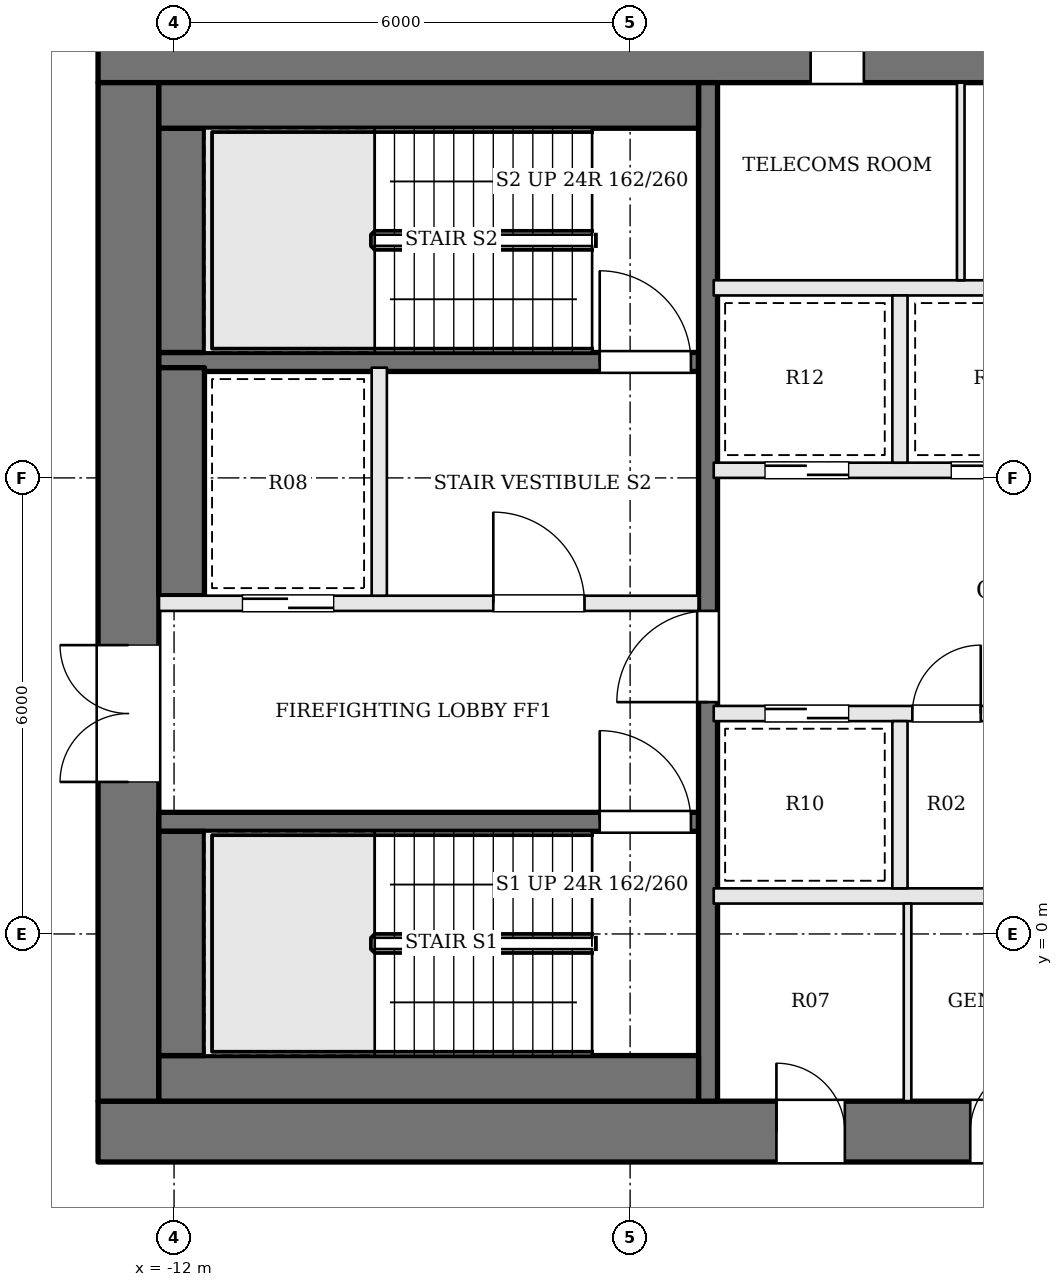
"""IFC4 building model, lengths in metres.
Left out: names, types, materials, properties, quantities, classifications, styles, units other than length and angle.
Written with IfcOpenShell. Run it as: python <this file> out.ifc"""

import sys

from ifc_helpers import new_model, si_unit, direction, frame, frame_2d, origin, place, context, subcontext, project, spatial, rectangle, extrude, element, fill, save


model = new_model("IFC4")
c1 = context("Model", 3, precision=1e-05, world=origin(), true_north=direction((0.0, 1.0)))
c2 = subcontext(c1, "Body", "Model", "MODEL_VIEW")
j1 = project(units=[si_unit("LENGTHUNIT", "METRE"), si_unit("PLANEANGLEUNIT", "RADIAN")], contexts=[c1])
p1 = place(None, origin())
s1 = spatial("IfcSite", under=j1, at=p1, CompositionType="ELEMENT")
p2 = place(p1, origin())
s2 = spatial("IfcBuilding", under=s1, at=p2, CompositionType="ELEMENT")
p3 = place(p2, frame((0.0, 0.0, 181.8)))
s3 = spatial("IfcBuildingStorey", under=s2, at=p3, CompositionType="ELEMENT", Elevation=181.8)
p4 = place(p3, frame((-13.0, 11.6, 0.0), z_axis=(0.0, 0.0, 1.0), x_axis=(1.0, 0.0, 0.0)))
e1 = element("IfcWall", 1, at=p4, inside=s3, PredefinedType="SHEAR", context=c2, shape_type="SweptSolid", body=[
    extrude(rectangle(XDim=26.0, YDim=0.8, at=frame_2d((13.0, 0.0))), origin(), (0.0, 0.0, 1.0), 3.9),
])
p5 = place(p4, frame((9.375, 0.0, 0.0)))
e2 = element("IfcOpeningElement", 2, at=p5, cuts=e1, PredefinedType="OPENING", context=c2, shape_type="SweptSolid", body=[
    extrude(rectangle(XDim=0.7, YDim=2.1, at=frame_2d((0.35, 1.05))), frame((0.0, 0.41, 0.0), z_axis=(0.0, -1.0, 0.0), x_axis=(1.0, 0.0, 0.0)), (0.0, 0.0, 1.0), 0.82),
])
p6 = place(p4, frame((12.075, 0.0, 0.0)))
e3 = element("IfcOpeningElement", 3, at=p6, cuts=e1, PredefinedType="OPENING", context=c2, shape_type="SweptSolid", body=[
    extrude(rectangle(XDim=1.0, YDim=2.1, at=frame_2d((0.5, 1.05))), frame((0.0, 0.41, 0.0), z_axis=(0.0, -1.0, 0.0), x_axis=(1.0, 0.0, 0.0)), (0.0, 0.0, 1.0), 0.82),
])
p7 = place(p4, frame((14.675, 0.0, 0.0)))
e4 = element("IfcOpeningElement", 4, at=p7, cuts=e1, PredefinedType="OPENING", context=c2, shape_type="SweptSolid", body=[
    extrude(rectangle(XDim=0.7, YDim=2.1, at=frame_2d((0.35, 1.05))), frame((0.0, 0.41, 0.0), z_axis=(0.0, -1.0, 0.0), x_axis=(1.0, 0.0, 0.0)), (0.0, 0.0, 1.0), 0.82),
])
p8 = place(p4, frame((16.625, 0.0, 0.0)))
e5 = element("IfcOpeningElement", 5, at=p8, cuts=e1, PredefinedType="OPENING", context=c2, shape_type="SweptSolid", body=[
    extrude(rectangle(XDim=0.9, YDim=2.1, at=frame_2d((0.45, 1.05))), frame((0.0, 0.41, 0.0), z_axis=(0.0, -1.0, 0.0), x_axis=(1.0, 0.0, 0.0)), (0.0, 0.0, 1.0), 0.82),
])
p9 = place(p3, frame((-13.0, -2.6, 0.0), z_axis=(0.0, 0.0, 1.0), x_axis=(1.0, 0.0, 0.0)))
e6 = element("IfcWall", 6, at=p9, inside=s3, PredefinedType="SHEAR", context=c2, shape_type="SweptSolid", body=[
    extrude(rectangle(XDim=26.0, YDim=0.8, at=frame_2d((13.0, 0.0))), origin(), (0.0, 0.0, 1.0), 3.9),
])
p10 = place(p9, frame((8.925, 0.0, 0.0)))
e7 = element("IfcOpeningElement", 7, at=p10, cuts=e6, PredefinedType="OPENING", context=c2, shape_type="SweptSolid", body=[
    extrude(rectangle(XDim=0.9, YDim=2.1, at=frame_2d((0.45, 1.05))), frame((0.0, 0.41, 0.0), z_axis=(0.0, -1.0, 0.0), x_axis=(1.0, 0.0, 0.0)), (0.0, 0.0, 1.0), 0.82),
])
p11 = place(p9, frame((11.475, 0.0, 0.0)))
e8 = element("IfcOpeningElement", 8, at=p11, cuts=e6, PredefinedType="OPENING", context=c2, shape_type="SweptSolid", body=[
    extrude(rectangle(XDim=0.9, YDim=2.1, at=frame_2d((0.45, 1.05))), frame((0.0, 0.41, 0.0), z_axis=(0.0, -1.0, 0.0), x_axis=(1.0, 0.0, 0.0)), (0.0, 0.0, 1.0), 0.82),
])
p12 = place(p9, frame((13.6, 0.0, 0.0)))
e9 = element("IfcOpeningElement", 9, at=p12, cuts=e6, PredefinedType="OPENING", context=c2, shape_type="SweptSolid", body=[
    extrude(rectangle(XDim=1.0, YDim=2.1, at=frame_2d((0.5, 1.05))), frame((0.0, 0.41, 0.0), z_axis=(0.0, -1.0, 0.0), x_axis=(1.0, 0.0, 0.0)), (0.0, 0.0, 1.0), 0.82),
])
p13 = place(p9, frame((15.95, 0.0, 0.0)))
e10 = element("IfcOpeningElement", 10, at=p13, cuts=e6, PredefinedType="OPENING", context=c2, shape_type="SweptSolid", body=[
    extrude(rectangle(XDim=1.0, YDim=2.1, at=frame_2d((0.5, 1.05))), frame((0.0, 0.41, 0.0), z_axis=(0.0, -1.0, 0.0), x_axis=(1.0, 0.0, 0.0)), (0.0, 0.0, 1.0), 0.82),
])
p14 = place(p3, frame((-12.6, -2.2, 0.0), z_axis=(0.0, 0.0, 1.0), x_axis=(0.0, 1.0, 0.0)))
e11 = element("IfcWall", 11, at=p14, inside=s3, PredefinedType="SHEAR", context=c2, shape_type="SweptSolid", body=[
    extrude(rectangle(XDim=13.4, YDim=0.8, at=frame_2d((6.7, 0.0))), origin(), (0.0, 0.0, 1.0), 3.9),
])
p15 = place(p14, frame((4.2, 0.0, 0.0)))
e12 = element("IfcOpeningElement", 12, at=p15, cuts=e11, PredefinedType="OPENING", context=c2, shape_type="SweptSolid", body=[
    extrude(rectangle(XDim=1.8, YDim=2.1, at=frame_2d((0.9, 1.05))), frame((0.0, 0.41, 0.0), z_axis=(0.0, -1.0, 0.0), x_axis=(1.0, 0.0, 0.0)), (0.0, 0.0, 1.0), 0.82),
])
p16 = place(p3, frame((-12.2, 1.475, 0.0), z_axis=(0.0, 0.0, 1.0), x_axis=(1.0, 0.0, 0.0)))
e13 = element("IfcWall", 13, at=p16, inside=s3, PredefinedType="SOLIDWALL", context=c2, shape_type="SweptSolid", body=[
    extrude(rectangle(XDim=7.1, YDim=0.25, at=frame_2d((3.55, 0.0))), origin(), (0.0, 0.0, 1.0), 3.7),
])
p17 = place(p16, frame((5.8, 0.0, 0.0)))
e14 = element("IfcOpeningElement", 14, at=p17, cuts=e13, PredefinedType="OPENING", context=c2, shape_type="SweptSolid", body=[
    extrude(rectangle(XDim=1.2, YDim=2.1, at=frame_2d((0.6, 1.05))), frame((0.0, 0.135, 0.0), z_axis=(0.0, -1.0, 0.0), x_axis=(1.0, 0.0, 0.0)), (0.0, 0.0, 1.0), 0.27),
])
p18 = place(p3, frame((-12.2, 4.35, 0.0), z_axis=(0.0, 0.0, 1.0), x_axis=(1.0, 0.0, 0.0)))
e15 = element("IfcWall", 15, at=p18, inside=s3, PredefinedType="SOLIDWALL", context=c2, shape_type="SweptSolid", body=[
    extrude(rectangle(XDim=7.1, YDim=0.2, at=frame_2d((3.55, 0.0))), origin(), (0.0, 0.0, 1.0), 3.7),
])
p19 = place(p18, frame((4.4, 0.0, 0.0)))
e16 = element("IfcOpeningElement", 16, at=p19, cuts=e15, PredefinedType="OPENING", context=c2, shape_type="SweptSolid", body=[
    extrude(rectangle(XDim=1.2, YDim=2.1, at=frame_2d((0.6, 1.05))), frame((0.0, 0.11, 0.0), z_axis=(0.0, -1.0, 0.0), x_axis=(1.0, 0.0, 0.0)), (0.0, 0.0, 1.0), 0.22),
])
p20 = place(p18, frame((1.1, 0.0, 0.0)))
e17 = element("IfcOpeningElement", 17, at=p20, cuts=e15, PredefinedType="OPENING", context=c2, shape_type="SweptSolid", body=[
    extrude(rectangle(XDim=1.2, YDim=2.1, at=frame_2d((0.6, 1.05))), frame((0.0, 0.11, 0.0), z_axis=(0.0, -1.0, 0.0), x_axis=(1.0, 0.0, 0.0)), (0.0, 0.0, 1.0), 0.22),
])
p21 = place(p3, frame((-12.2, 7.525, 0.0), z_axis=(0.0, 0.0, 1.0), x_axis=(1.0, 0.0, 0.0)))
e18 = element("IfcWall", 18, at=p21, inside=s3, PredefinedType="SOLIDWALL", context=c2, shape_type="SweptSolid", body=[
    extrude(rectangle(XDim=7.1, YDim=0.25, at=frame_2d((3.55, 0.0))), origin(), (0.0, 0.0, 1.0), 3.7),
])
p22 = place(p21, frame((5.8, 0.0, 0.0)))
e19 = element("IfcOpeningElement", 19, at=p22, cuts=e18, PredefinedType="OPENING", context=c2, shape_type="SweptSolid", body=[
    extrude(rectangle(XDim=1.2, YDim=2.1, at=frame_2d((0.6, 1.05))), frame((0.0, 0.135, 0.0), z_axis=(0.0, -1.0, 0.0), x_axis=(1.0, 0.0, 0.0)), (0.0, 0.0, 1.0), 0.27),
])
p23 = place(p3, frame((-9.3, 4.45, 0.0), z_axis=(0.0, 0.0, 1.0), x_axis=(0.0, 1.0, 0.0)))
e20 = element("IfcWall", 20, at=p23, inside=s3, PredefinedType="SOLIDWALL", context=c2, shape_type="SweptSolid", body=[
    extrude(rectangle(XDim=3.0, YDim=0.2, at=frame_2d((1.5, 0.0))), origin(), (0.0, 0.0, 1.0), 3.7),
])
p24 = place(p3, frame((-4.975, -2.2, 0.0), z_axis=(0.0, 0.0, 1.0), x_axis=(0.0, 1.0, 0.0)))
e21 = element("IfcWall", 21, at=p24, inside=s3, PredefinedType="SOLIDWALL", context=c2, shape_type="SweptSolid", body=[
    extrude(rectangle(XDim=13.4, YDim=0.25, at=frame_2d((6.7, 0.0))), origin(), (0.0, 0.0, 1.0), 3.7),
])
p25 = place(p24, frame((5.25, 0.0, 0.0)))
e22 = element("IfcOpeningElement", 22, at=p25, cuts=e21, PredefinedType="OPENING", context=c2, shape_type="SweptSolid", body=[
    extrude(rectangle(XDim=1.2, YDim=2.1, at=frame_2d((0.6, 1.05))), frame((0.0, 0.135, 0.0), z_axis=(0.0, -1.0, 0.0), x_axis=(1.0, 0.0, 0.0)), (0.0, 0.0, 1.0), 0.27),
])
p26 = place(p3, frame((-12.2, -1.9, 0.0), z_axis=(0.0, 0.0, 1.0), x_axis=(1.0, 0.0, 0.0)))
e23 = element("IfcWall", 23, at=p26, inside=s3, PredefinedType="SOLIDWALL", context=c2, shape_type="SweptSolid", body=[
    extrude(rectangle(XDim=7.1, YDim=0.6, at=frame_2d((3.55, 0.0))), origin(), (0.0, 0.0, 1.0), 3.7),
])
p27 = place(p3, frame((-11.9, -1.6, 0.0), z_axis=(0.0, 0.0, 1.0), x_axis=(0.0, 1.0, 0.0)))
e24 = element("IfcWall", 24, at=p27, inside=s3, PredefinedType="SOLIDWALL", context=c2, shape_type="SweptSolid", body=[
    extrude(rectangle(XDim=2.95, YDim=0.6, at=frame_2d((1.475, 0.0))), origin(), (0.0, 0.0, 1.0), 3.7),
])
p28 = place(p3, frame((-11.9, 4.45, 0.0), z_axis=(0.0, 0.0, 1.0), x_axis=(0.0, 1.0, 0.0)))
e25 = element("IfcWall", 25, at=p28, inside=s3, PredefinedType="SOLIDWALL", context=c2, shape_type="SweptSolid", body=[
    extrude(rectangle(XDim=3.0, YDim=0.6, at=frame_2d((1.5, 0.0))), origin(), (0.0, 0.0, 1.0), 3.7),
])
p29 = place(p3, frame((-11.9, 7.65, 0.0), z_axis=(0.0, 0.0, 1.0), x_axis=(0.0, 1.0, 0.0)))
e26 = element("IfcWall", 26, at=p29, inside=s3, PredefinedType="SOLIDWALL", context=c2, shape_type="SweptSolid", body=[
    extrude(rectangle(XDim=2.95, YDim=0.6, at=frame_2d((1.475, 0.0))), origin(), (0.0, 0.0, 1.0), 3.7),
])
p30 = place(p3, frame((-12.2, 10.9, 0.0), z_axis=(0.0, 0.0, 1.0), x_axis=(1.0, 0.0, 0.0)))
e27 = element("IfcWall", 27, at=p30, inside=s3, PredefinedType="SOLIDWALL", context=c2, shape_type="SweptSolid", body=[
    extrude(rectangle(XDim=7.1, YDim=0.6, at=frame_2d((3.55, 0.0))), origin(), (0.0, 0.0, 1.0), 3.7),
])
p31 = place(p3, frame((-4.9, 0.5, 0.0), z_axis=(0.0, 0.0, 1.0), x_axis=(1.0, 0.0, 0.0)))
e28 = element("IfcWall", 28, at=p31, inside=s3, PredefinedType="SOLIDWALL", context=c2, shape_type="SweptSolid", body=[
    extrude(rectangle(XDim=9.8, YDim=0.2, at=frame_2d((4.9, 0.0))), origin(), (0.0, 0.0, 1.0), 3.7),
])
p32 = place(p3, frame((-4.9, 2.9, 0.0), z_axis=(0.0, 0.0, 1.0), x_axis=(1.0, 0.0, 0.0)))
e29 = element("IfcWall", 29, at=p32, inside=s3, PredefinedType="SOLIDWALL", context=c2, shape_type="SweptSolid", body=[
    extrude(rectangle(XDim=9.8, YDim=0.2, at=frame_2d((4.9, 0.0))), origin(), (0.0, 0.0, 1.0), 3.7),
])
p33 = place(p32, frame((0.675, 0.0, 0.0)))
e30 = element("IfcOpeningElement", 30, at=p33, cuts=e29, PredefinedType="OPENING", context=c2, shape_type="SweptSolid", body=[
    extrude(rectangle(XDim=1.1, YDim=2.1, at=frame_2d((0.55, 1.05))), frame((0.0, 0.11, 0.0), z_axis=(0.0, -1.0, 0.0), x_axis=(1.0, 0.0, 0.0)), (0.0, 0.0, 1.0), 0.22),
])
p34 = place(p32, frame((2.613, 0.0, 0.0)))
e31 = element("IfcOpeningElement", 31, at=p34, cuts=e29, PredefinedType="OPENING", context=c2, shape_type="SweptSolid", body=[
    extrude(rectangle(XDim=0.9, YDim=2.1, at=frame_2d((0.45, 1.05))), frame((0.0, 0.11, 0.0), z_axis=(0.0, -1.0, 0.0), x_axis=(1.0, 0.0, 0.0)), (0.0, 0.0, 1.0), 0.22),
])
p35 = place(p32, frame((4.35, 0.0, 0.0)))
e32 = element("IfcOpeningElement", 32, at=p35, cuts=e29, PredefinedType="OPENING", context=c2, shape_type="SweptSolid", body=[
    extrude(rectangle(XDim=1.1, YDim=2.1, at=frame_2d((0.55, 1.05))), frame((0.0, 0.11, 0.0), z_axis=(0.0, -1.0, 0.0), x_axis=(1.0, 0.0, 0.0)), (0.0, 0.0, 1.0), 0.22),
])
p36 = place(p32, frame((7.463, 0.0, 0.0)))
e33 = element("IfcOpeningElement", 33, at=p36, cuts=e29, PredefinedType="OPENING", context=c2, shape_type="SweptSolid", body=[
    extrude(rectangle(XDim=1.0, YDim=2.1, at=frame_2d((0.5, 1.05))), frame((0.0, 0.11, 0.0), z_axis=(0.0, -1.0, 0.0), x_axis=(1.0, 0.0, 0.0)), (0.0, 0.0, 1.0), 0.22),
])
p37 = place(p3, frame((-4.9, 6.1, 0.0), z_axis=(0.0, 0.0, 1.0), x_axis=(1.0, 0.0, 0.0)))
e34 = element("IfcWall", 34, at=p37, inside=s3, PredefinedType="SOLIDWALL", context=c2, shape_type="SweptSolid", body=[
    extrude(rectangle(XDim=9.8, YDim=0.2, at=frame_2d((4.9, 0.0))), origin(), (0.0, 0.0, 1.0), 3.7),
])
p38 = place(p37, frame((0.675, 0.0, 0.0)))
e35 = element("IfcOpeningElement", 35, at=p38, cuts=e34, PredefinedType="OPENING", context=c2, shape_type="SweptSolid", body=[
    extrude(rectangle(XDim=1.1, YDim=2.1, at=frame_2d((0.55, 1.05))), frame((0.0, 0.11, 0.0), z_axis=(0.0, -1.0, 0.0), x_axis=(1.0, 0.0, 0.0)), (0.0, 0.0, 1.0), 0.22),
])
p39 = place(p37, frame((3.125, 0.0, 0.0)))
e36 = element("IfcOpeningElement", 36, at=p39, cuts=e34, PredefinedType="OPENING", context=c2, shape_type="SweptSolid", body=[
    extrude(rectangle(XDim=1.1, YDim=2.1, at=frame_2d((0.55, 1.05))), frame((0.0, 0.11, 0.0), z_axis=(0.0, -1.0, 0.0), x_axis=(1.0, 0.0, 0.0)), (0.0, 0.0, 1.0), 0.22),
])
p40 = place(p37, frame((5.575, 0.0, 0.0)))
e37 = element("IfcOpeningElement", 37, at=p40, cuts=e34, PredefinedType="OPENING", context=c2, shape_type="SweptSolid", body=[
    extrude(rectangle(XDim=1.1, YDim=2.1, at=frame_2d((0.55, 1.05))), frame((0.0, 0.11, 0.0), z_axis=(0.0, -1.0, 0.0), x_axis=(1.0, 0.0, 0.0)), (0.0, 0.0, 1.0), 0.22),
])
p41 = place(p37, frame((8.025, 0.0, 0.0)))
e38 = element("IfcOpeningElement", 38, at=p41, cuts=e34, PredefinedType="OPENING", context=c2, shape_type="SweptSolid", body=[
    extrude(rectangle(XDim=1.1, YDim=2.1, at=frame_2d((0.55, 1.05))), frame((0.0, 0.11, 0.0), z_axis=(0.0, -1.0, 0.0), x_axis=(1.0, 0.0, 0.0)), (0.0, 0.0, 1.0), 0.22),
])
p42 = place(p3, frame((-4.9, 8.5, 0.0), z_axis=(0.0, 0.0, 1.0), x_axis=(1.0, 0.0, 0.0)))
e39 = element("IfcWall", 39, at=p42, inside=s3, PredefinedType="SOLIDWALL", context=c2, shape_type="SweptSolid", body=[
    extrude(rectangle(XDim=9.8, YDim=0.2, at=frame_2d((4.9, 0.0))), origin(), (0.0, 0.0, 1.0), 3.7),
])
for number, where, z_axis, x_axis in (
    (40, (-2.45, 0.6, 0.0), (0.0, 0.0, 1.0), (0.0, 1.0, 0.0)),
    (41, (-2.45, 6.2, 0.0), (0.0, 0.0, 1.0), (0.0, 1.0, 0.0)),
):
    element("IfcWall", number, at=place(p3, frame(where, z_axis=z_axis, x_axis=x_axis)), inside=s3, PredefinedType="SOLIDWALL", context=c2, shape_type="SweptSolid", body=[
        extrude(rectangle(XDim=2.2, YDim=0.2, at=frame_2d((1.1, 0.0))), origin(), (0.0, 0.0, 1.0), 3.7),
    ])
for number, where, z_axis, x_axis in (
    (42, (-2.35, -2.2, 0.0), (0.0, 0.0, 1.0), (0.0, 1.0, 0.0)),
    (43, (-1.65, 8.6, 0.0), (0.0, 0.0, 1.0), (0.0, 1.0, 0.0)),
):
    element("IfcWall", number, at=place(p3, frame(where, z_axis=z_axis, x_axis=x_axis)), inside=s3, PredefinedType="PARTITIONING", context=c2, shape_type="SweptSolid", body=[
        extrude(rectangle(XDim=2.6, YDim=0.1, at=frame_2d((1.3, 0.0))), origin(), (0.0, 0.0, 1.0), 3.7),
    ])
p43 = place(p15, origin())
e44 = element("IfcDoor", 44, at=p43, inside=s3, OperationType="DOUBLE_DOOR_SINGLE_SWING", PredefinedType="DOOR", context=c2, shape_type="SweptSolid", body=[
    extrude(rectangle(XDim=1.8, YDim=2.1, at=frame_2d((0.9, 1.05))), frame((0.0, 0.025, 0.0), z_axis=(0.0, -1.0, 0.0), x_axis=(1.0, 0.0, 0.0)), (0.0, 0.0, 1.0), 0.05),
])
fill(e12, e44)
p44 = place(p25, origin())
e45 = element("IfcDoor", 45, at=p44, inside=s3, OperationType="SINGLE_SWING_LEFT", PredefinedType="DOOR", context=c2, shape_type="SweptSolid", body=[
    extrude(rectangle(XDim=1.2, YDim=2.1, at=frame_2d((0.6, 1.05))), frame((0.0, 0.025, 0.0), z_axis=(0.0, -1.0, 0.0), x_axis=(1.0, 0.0, 0.0)), (0.0, 0.0, 1.0), 0.05),
])
fill(e22, e45)
p45 = place(p19, origin())
e46 = element("IfcDoor", 46, at=p45, inside=s3, OperationType="SINGLE_SWING_LEFT", PredefinedType="DOOR", context=c2, shape_type="SweptSolid", body=[
    extrude(rectangle(XDim=1.2, YDim=2.1, at=frame_2d((0.6, 1.05))), frame((0.0, 0.025, 0.0), z_axis=(0.0, -1.0, 0.0), x_axis=(1.0, 0.0, 0.0)), (0.0, 0.0, 1.0), 0.05),
])
fill(e16, e46)
p46 = place(p17, origin())
e47 = element("IfcDoor", 47, at=p46, inside=s3, OperationType="SINGLE_SWING_LEFT", PredefinedType="DOOR", context=c2, shape_type="SweptSolid", body=[
    extrude(rectangle(XDim=1.2, YDim=2.1, at=frame_2d((0.6, 1.05))), frame((0.0, 0.025, 0.0), z_axis=(0.0, -1.0, 0.0), x_axis=(1.0, 0.0, 0.0)), (0.0, 0.0, 1.0), 0.05),
])
fill(e14, e47)
p47 = place(p22, origin())
e48 = element("IfcDoor", 48, at=p47, inside=s3, OperationType="SINGLE_SWING_LEFT", PredefinedType="DOOR", context=c2, shape_type="SweptSolid", body=[
    extrude(rectangle(XDim=1.2, YDim=2.1, at=frame_2d((0.6, 1.05))), frame((0.0, 0.025, 0.0), z_axis=(0.0, -1.0, 0.0), x_axis=(1.0, 0.0, 0.0)), (0.0, 0.0, 1.0), 0.05),
])
fill(e19, e48)
p48 = place(p20, origin())
e49 = element("IfcDoor", 49, at=p48, inside=s3, OperationType="SLIDING_TO_RIGHT", PredefinedType="DOOR", context=c2, shape_type="SweptSolid", body=[
    extrude(rectangle(XDim=1.2, YDim=2.1, at=frame_2d((0.6, 1.05))), frame((0.0, 0.025, 0.0), z_axis=(0.0, -1.0, 0.0), x_axis=(1.0, 0.0, 0.0)), (0.0, 0.0, 1.0), 0.05),
])
fill(e17, e49)
p49 = place(p33, origin())
e50 = element("IfcDoor", 50, at=p49, inside=s3, OperationType="SLIDING_TO_RIGHT", PredefinedType="DOOR", context=c2, shape_type="SweptSolid", body=[
    extrude(rectangle(XDim=1.1, YDim=2.1, at=frame_2d((0.55, 1.05))), frame((0.0, 0.025, 0.0), z_axis=(0.0, -1.0, 0.0), x_axis=(1.0, 0.0, 0.0)), (0.0, 0.0, 1.0), 0.05),
])
fill(e30, e50)
p50 = place(p34, origin())
e51 = element("IfcDoor", 51, at=p50, inside=s3, OperationType="SINGLE_SWING_RIGHT", PredefinedType="DOOR", context=c2, shape_type="SweptSolid", body=[
    extrude(rectangle(XDim=0.9, YDim=2.1, at=frame_2d((0.45, 1.05))), frame((0.0, 0.025, 0.0), z_axis=(0.0, -1.0, 0.0), x_axis=(1.0, 0.0, 0.0)), (0.0, 0.0, 1.0), 0.05),
])
fill(e31, e51)
p51 = place(p38, origin())
e52 = element("IfcDoor", 52, at=p51, inside=s3, OperationType="SLIDING_TO_RIGHT", PredefinedType="DOOR", context=c2, shape_type="SweptSolid", body=[
    extrude(rectangle(XDim=1.1, YDim=2.1, at=frame_2d((0.55, 1.05))), frame((0.0, 0.025, 0.0), z_axis=(0.0, -1.0, 0.0), x_axis=(1.0, 0.0, 0.0)), (0.0, 0.0, 1.0), 0.05),
])
fill(e35, e52)
p52 = place(p39, origin())
e53 = element("IfcDoor", 53, at=p52, inside=s3, OperationType="SLIDING_TO_LEFT", PredefinedType="DOOR", context=c2, shape_type="SweptSolid", body=[
    extrude(rectangle(XDim=1.1, YDim=2.1, at=frame_2d((0.55, 1.05))), frame((0.0, 0.025, 0.0), z_axis=(0.0, -1.0, 0.0), x_axis=(1.0, 0.0, 0.0)), (0.0, 0.0, 1.0), 0.05),
])
fill(e36, e53)
p53 = place(p10, origin())
e54 = element("IfcDoor", 54, at=p53, inside=s3, OperationType="SINGLE_SWING_LEFT", PredefinedType="DOOR", context=c2, shape_type="SweptSolid", body=[
    extrude(rectangle(XDim=0.9, YDim=2.1, at=frame_2d((0.45, 1.05))), frame((0.0, 0.025, 0.0), z_axis=(0.0, -1.0, 0.0), x_axis=(1.0, 0.0, 0.0)), (0.0, 0.0, 1.0), 0.05),
])
fill(e7, e54)
p54 = place(p11, origin())
e55 = element("IfcDoor", 55, at=p54, inside=s3, OperationType="SINGLE_SWING_RIGHT", PredefinedType="DOOR", context=c2, shape_type="SweptSolid", body=[
    extrude(rectangle(XDim=0.9, YDim=2.1, at=frame_2d((0.45, 1.05))), frame((0.0, 0.025, 0.0), z_axis=(0.0, -1.0, 0.0), x_axis=(1.0, 0.0, 0.0)), (0.0, 0.0, 1.0), 0.05),
])
fill(e8, e55)
p55 = place(p5, origin())
e56 = element("IfcDoor", 56, at=p55, inside=s3, OperationType="SINGLE_SWING_LEFT", PredefinedType="DOOR", context=c2, shape_type="SweptSolid", body=[
    extrude(rectangle(XDim=0.7, YDim=2.1, at=frame_2d((0.35, 1.05))), frame((0.0, 0.025, 0.0), z_axis=(0.0, -1.0, 0.0), x_axis=(1.0, 0.0, 0.0)), (0.0, 0.0, 1.0), 0.05),
])
fill(e2, e56)
save(model, sys.argv[1])
